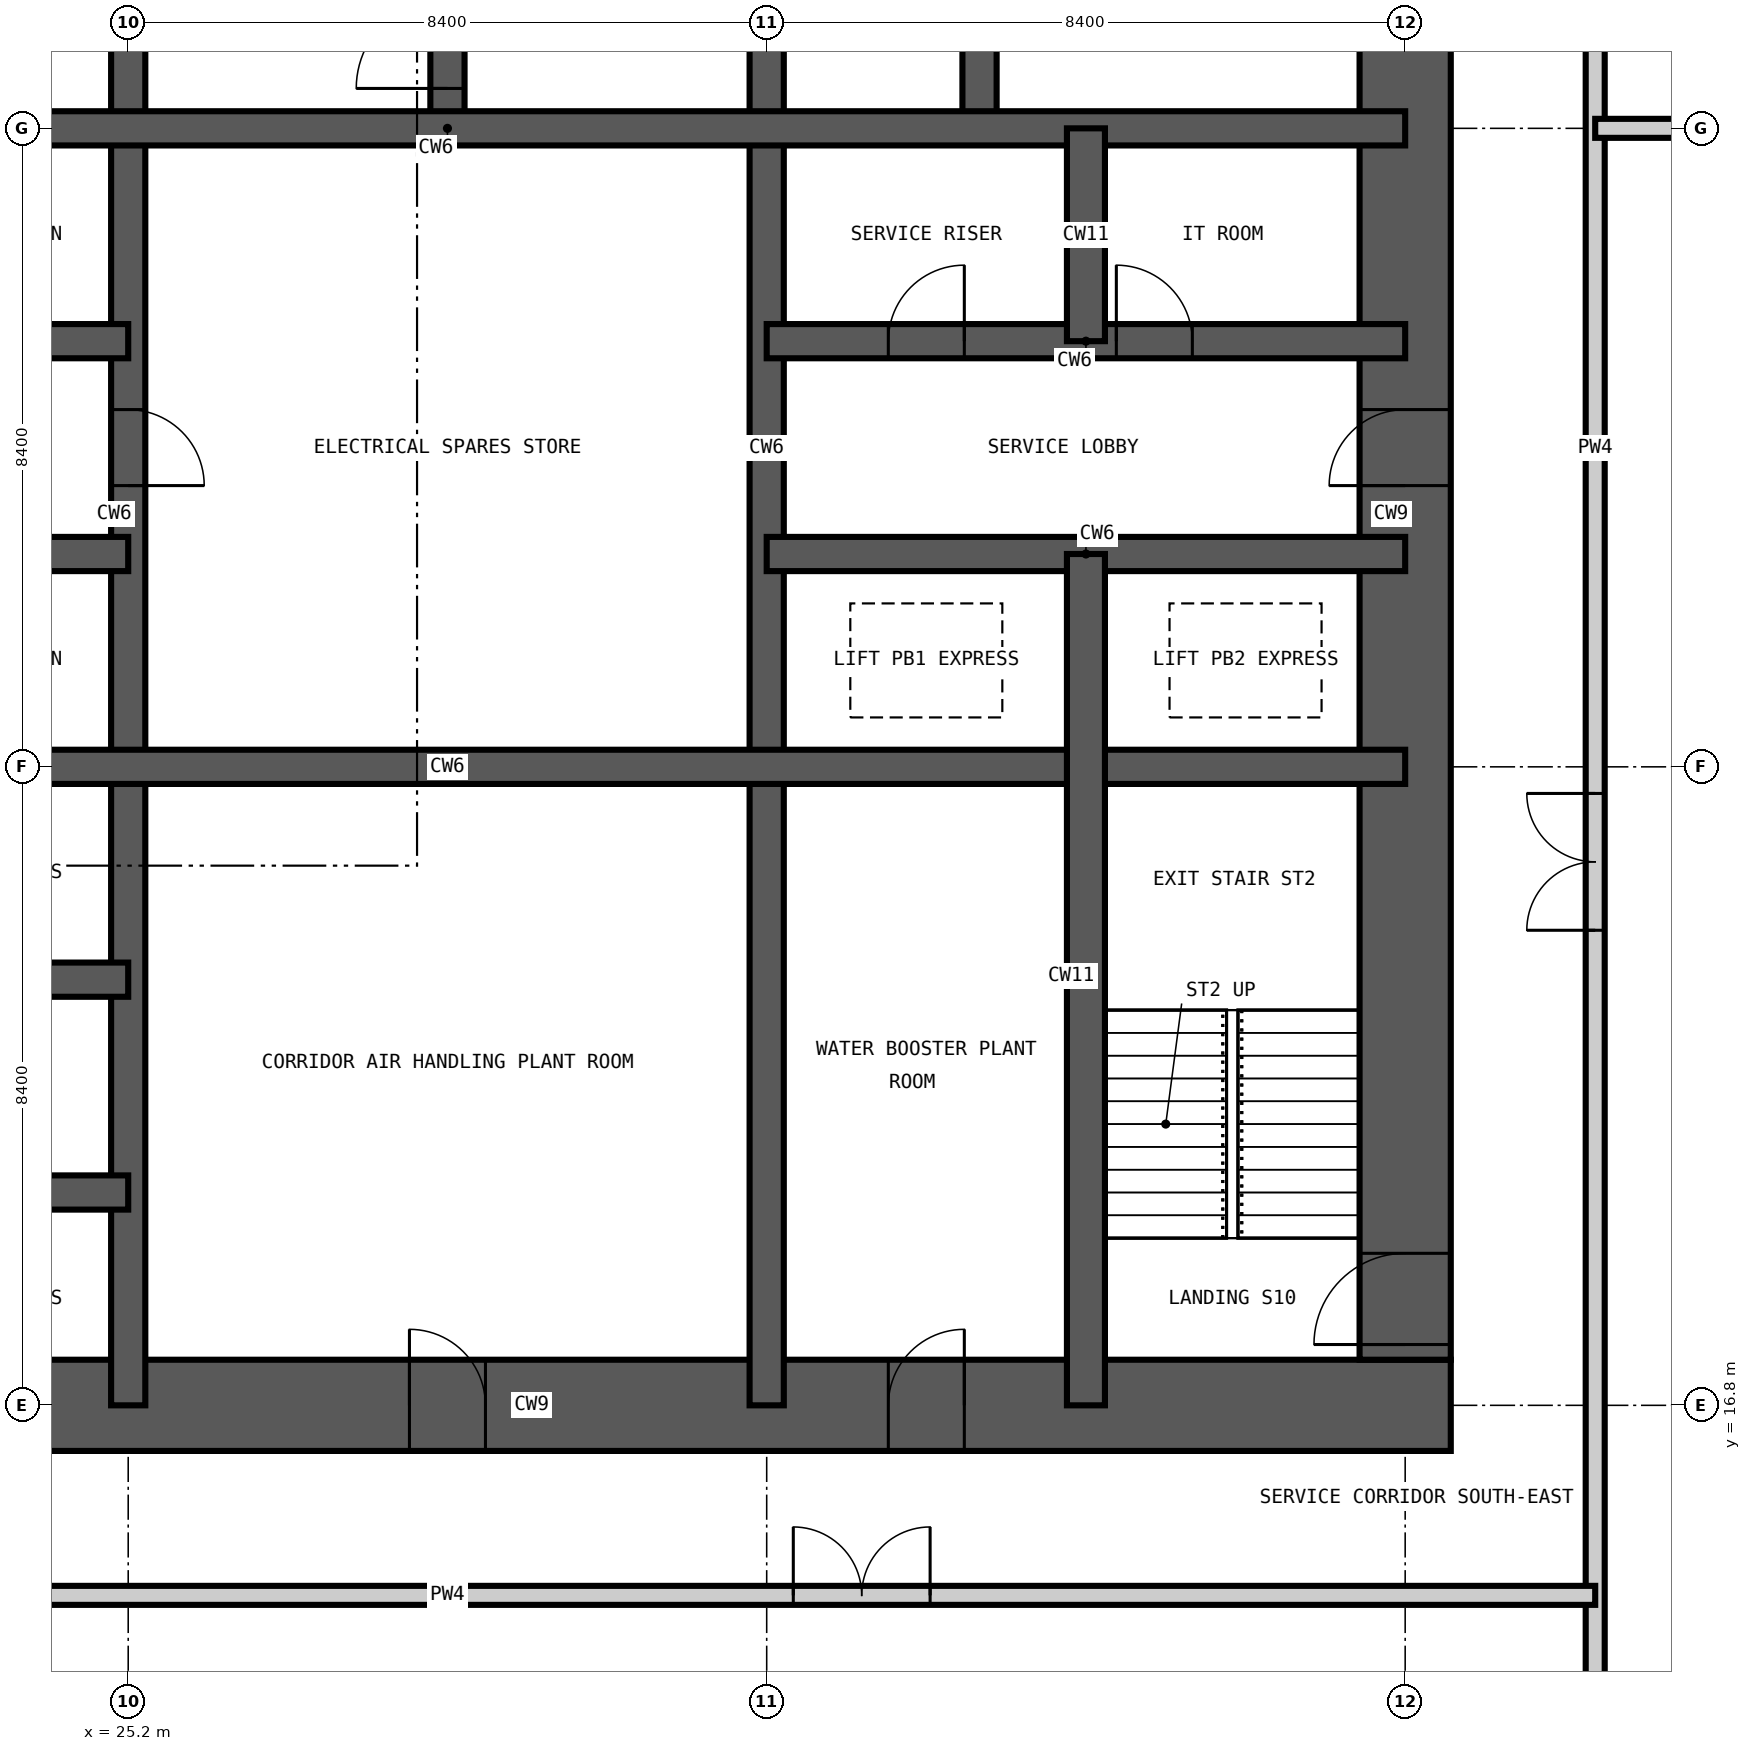
"""IFC4 building model, lengths in metres.
Left out: names, types, materials, properties, quantities, classifications, styles, units other than length and angle.
Written with IfcOpenShell. Run it as: python <this file> out.ifc"""

import sys

from ifc_helpers import new_model, si_unit, direction, frame, frame_2d, origin, place, context, subcontext, project, spatial, rectangle, extrude, element, fill, save


model = new_model("IFC4")
c1 = context("Model", 3, precision=1e-05, world=origin(), true_north=direction((0.0, 1.0)))
c2 = subcontext(c1, "Body", "Model", "MODEL_VIEW")
j1 = project(units=[si_unit("LENGTHUNIT", "METRE"), si_unit("PLANEANGLEUNIT", "RADIAN")], contexts=[c1])
p1 = place(None, origin())
s1 = spatial("IfcSite", under=j1, at=p1, CompositionType="ELEMENT")
p2 = place(p1, origin())
s2 = spatial("IfcBuilding", under=s1, at=p2, CompositionType="ELEMENT")
p3 = place(p2, frame((0.0, 0.0, 88.2)))
s3 = spatial("IfcBuildingStorey", under=s2, at=p3, CompositionType="ELEMENT", Elevation=88.2)
p4 = place(p3, frame((16.2, 16.8, -0.4), z_axis=(0.0, 0.0, 1.0), x_axis=(1.0, 0.0, 0.0)))
e1 = element("IfcWall", 1, at=p4, inside=s3, PredefinedType="SHEAR", context=c2, shape_type="SweptSolid", body=[
    extrude(rectangle(XDim=26.4, YDim=1.2, at=frame_2d((13.2, 0.0))), origin(), (0.0, 0.0, 1.0), 5.45),
])
p5 = place(p4, frame((12.7, 0.0, 0.4)))
e2 = element("IfcOpeningElement", 2, at=p5, cuts=e1, PredefinedType="OPENING", context=c2, shape_type="SweptSolid", body=[
    extrude(rectangle(XDim=1.0, YDim=2.1, at=frame_2d((0.5, 1.05))), frame((0.0, 0.61, 0.0), z_axis=(0.0, -1.0, 0.0), x_axis=(1.0, 0.0, 0.0)), (0.0, 0.0, 1.0), 1.22),
])
p6 = place(p4, frame((19.0, 0.0, 0.4)))
e3 = element("IfcOpeningElement", 3, at=p6, cuts=e1, PredefinedType="OPENING", context=c2, shape_type="SweptSolid", body=[
    extrude(rectangle(XDim=1.0, YDim=2.1, at=frame_2d((0.5, 1.05))), frame((0.0, 0.61, 0.0), z_axis=(0.0, -1.0, 0.0), x_axis=(1.0, 0.0, 0.0)), (0.0, 0.0, 1.0), 1.22),
])
p7 = place(p3, frame((42.0, 17.4, -0.4), z_axis=(0.0, 0.0, 1.0), x_axis=(0.0, 1.0, 0.0)))
e4 = element("IfcWall", 4, at=p7, inside=s3, PredefinedType="SHEAR", context=c2, shape_type="SweptSolid", body=[
    extrude(rectangle(XDim=24.0, YDim=1.2, at=frame_2d((12.0, 0.0))), origin(), (0.0, 0.0, 1.0), 5.45),
])
p8 = place(p7, frame((0.2, 0.0, 0.4)))
e5 = element("IfcOpeningElement", 5, at=p8, cuts=e4, PredefinedType="OPENING", context=c2, shape_type="SweptSolid", body=[
    extrude(rectangle(XDim=1.2, YDim=2.2, at=frame_2d((0.6, 1.1))), frame((0.0, 0.61, 0.0), z_axis=(0.0, -1.0, 0.0), x_axis=(1.0, 0.0, 0.0)), (0.0, 0.0, 1.0), 1.22),
])
p9 = place(p7, frame((11.5, 0.0, 0.4)))
e6 = element("IfcOpeningElement", 6, at=p9, cuts=e4, PredefinedType="OPENING", context=c2, shape_type="SweptSolid", body=[
    extrude(rectangle(XDim=1.0, YDim=2.1, at=frame_2d((0.5, 1.05))), frame((0.0, 0.61, 0.0), z_axis=(0.0, -1.0, 0.0), x_axis=(1.0, 0.0, 0.0)), (0.0, 0.0, 1.0), 1.22),
])
p10 = place(p7, frame((19.9, 0.0, 0.4)))
e7 = element("IfcOpeningElement", 7, at=p10, cuts=e4, PredefinedType="OPENING", context=c2, shape_type="SweptSolid", body=[
    extrude(rectangle(XDim=1.0, YDim=2.1, at=frame_2d((0.5, 1.05))), frame((0.0, 0.61, 0.0), z_axis=(0.0, -1.0, 0.0), x_axis=(1.0, 0.0, 0.0)), (0.0, 0.0, 1.0), 1.22),
])
p11 = place(p3, frame((25.2, 16.8, -0.4), z_axis=(0.0, 0.0, 1.0), x_axis=(0.0, 1.0, 0.0)))
e8 = element("IfcWall", 8, at=p11, inside=s3, PredefinedType="SHEAR", context=c2, shape_type="SweptSolid", body=[
    extrude(rectangle(XDim=25.2, YDim=0.45, at=frame_2d((12.6, 0.0))), origin(), (0.0, 0.0, 1.0), 5.45),
])
p12 = place(p11, frame((12.1, 0.0, 0.4)))
e9 = element("IfcOpeningElement", 9, at=p12, cuts=e8, PredefinedType="OPENING", context=c2, shape_type="SweptSolid", body=[
    extrude(rectangle(XDim=1.0, YDim=2.1, at=frame_2d((0.5, 1.05))), frame((0.0, 0.235, 0.0), z_axis=(0.0, -1.0, 0.0), x_axis=(1.0, 0.0, 0.0)), (0.0, 0.0, 1.0), 0.47),
])
p13 = place(p3, frame((29.4, 33.6, -0.4), z_axis=(0.0, 0.0, 1.0), x_axis=(0.0, 1.0, 0.0)))
e10 = element("IfcWall", 10, at=p13, inside=s3, PredefinedType="SHEAR", context=c2, shape_type="SweptSolid", body=[
    extrude(rectangle(XDim=8.4, YDim=0.45, at=frame_2d((4.2, 0.0))), origin(), (0.0, 0.0, 1.0), 5.45),
])
p14 = place(p13, frame((0.525, 0.0, 0.4)))
e11 = element("IfcOpeningElement", 11, at=p14, cuts=e10, PredefinedType="OPENING", context=c2, shape_type="SweptSolid", body=[
    extrude(rectangle(XDim=1.2, YDim=2.2, at=frame_2d((0.6, 1.1))), frame((0.0, 0.235, 0.0), z_axis=(0.0, -1.0, 0.0), x_axis=(1.0, 0.0, 0.0)), (0.0, 0.0, 1.0), 0.47),
])
p15 = place(p3, frame((33.6, 16.8, -0.4), z_axis=(0.0, 0.0, 1.0), x_axis=(0.0, 1.0, 0.0)))
e12 = element("IfcWall", 12, at=p15, inside=s3, PredefinedType="SHEAR", context=c2, shape_type="SweptSolid", body=[
    extrude(rectangle(XDim=25.2, YDim=0.45, at=frame_2d((12.6, 0.0))), origin(), (0.0, 0.0, 1.0), 5.45),
])
p16 = place(p15, frame((22.5, 0.0, 0.4)))
e13 = element("IfcOpeningElement", 13, at=p16, cuts=e12, PredefinedType="OPENING", context=c2, shape_type="SweptSolid", body=[
    extrude(rectangle(XDim=1.2, YDim=2.2, at=frame_2d((0.6, 1.1))), frame((0.0, 0.235, 0.0), z_axis=(0.0, -1.0, 0.0), x_axis=(1.0, 0.0, 0.0)), (0.0, 0.0, 1.0), 0.47),
])
p17 = place(p15, frame((18.3, 0.0, 0.4)))
e14 = element("IfcOpeningElement", 14, at=p17, cuts=e12, PredefinedType="OPENING", context=c2, shape_type="SweptSolid", body=[
    extrude(rectangle(XDim=1.2, YDim=2.2, at=frame_2d((0.6, 1.1))), frame((0.0, 0.235, 0.0), z_axis=(0.0, -1.0, 0.0), x_axis=(1.0, 0.0, 0.0)), (0.0, 0.0, 1.0), 0.47),
])
for number, where, z_axis, x_axis in (
    (15, (36.4, 33.6, -0.4), (0.0, 0.0, 1.0), (0.0, 1.0, 0.0)),
    (16, (16.8, 19.6, -0.4), (0.0, 0.0, 1.0), (1.0, 0.0, 0.0)),
    (17, (16.8, 22.4, -0.4), (0.0, 0.0, 1.0), (1.0, 0.0, 0.0)),
):
    element("IfcWall", number, at=place(p3, frame(where, z_axis=z_axis, x_axis=x_axis)), inside=s3, PredefinedType="SHEAR", context=c2, shape_type="SweptSolid", body=[
        extrude(rectangle(XDim=8.4, YDim=0.45, at=frame_2d((4.2, 0.0))), origin(), (0.0, 0.0, 1.0), 5.45),
    ])
p18 = place(p3, frame((16.8, 25.2, -0.4), z_axis=(0.0, 0.0, 1.0), x_axis=(1.0, 0.0, 0.0)))
e18 = element("IfcWall", 18, at=p18, inside=s3, PredefinedType="SHEAR", context=c2, shape_type="SweptSolid", body=[
    extrude(rectangle(XDim=25.2, YDim=0.45, at=frame_2d((12.6, 0.0))), origin(), (0.0, 0.0, 1.0), 5.45),
])
for number, where, z_axis, x_axis in (
    (19, (16.8, 28.0, -0.4), (0.0, 0.0, 1.0), (1.0, 0.0, 0.0)),
    (20, (33.6, 28.0, -0.4), (0.0, 0.0, 1.0), (1.0, 0.0, 0.0)),
    (21, (16.8, 30.8, -0.4), (0.0, 0.0, 1.0), (1.0, 0.0, 0.0)),
):
    element("IfcWall", number, at=place(p3, frame(where, z_axis=z_axis, x_axis=x_axis)), inside=s3, PredefinedType="SHEAR", context=c2, shape_type="SweptSolid", body=[
        extrude(rectangle(XDim=8.4, YDim=0.45, at=frame_2d((4.2, 0.0))), origin(), (0.0, 0.0, 1.0), 5.45),
    ])
p19 = place(p3, frame((33.6, 30.8, -0.4), z_axis=(0.0, 0.0, 1.0), x_axis=(1.0, 0.0, 0.0)))
e22 = element("IfcWall", 22, at=p19, inside=s3, PredefinedType="SHEAR", context=c2, shape_type="SweptSolid", body=[
    extrude(rectangle(XDim=8.4, YDim=0.45, at=frame_2d((4.2, 0.0))), origin(), (0.0, 0.0, 1.0), 5.45),
])
p20 = place(p19, frame((1.6, 0.0, 0.4)))
e23 = element("IfcOpeningElement", 23, at=p20, cuts=e22, PredefinedType="OPENING", context=c2, shape_type="SweptSolid", body=[
    extrude(rectangle(XDim=1.0, YDim=2.1, at=frame_2d((0.5, 1.05))), frame((0.0, 0.235, 0.0), z_axis=(0.0, -1.0, 0.0), x_axis=(1.0, 0.0, 0.0)), (0.0, 0.0, 1.0), 0.47),
])
p21 = place(p19, frame((4.6, 0.0, 0.4)))
e24 = element("IfcOpeningElement", 24, at=p21, cuts=e22, PredefinedType="OPENING", context=c2, shape_type="SweptSolid", body=[
    extrude(rectangle(XDim=1.0, YDim=2.1, at=frame_2d((0.5, 1.05))), frame((0.0, 0.235, 0.0), z_axis=(0.0, -1.0, 0.0), x_axis=(1.0, 0.0, 0.0)), (0.0, 0.0, 1.0), 0.47),
])
p22 = place(p3, frame((16.8, 33.6, -0.4), z_axis=(0.0, 0.0, 1.0), x_axis=(1.0, 0.0, 0.0)))
e25 = element("IfcWall", 25, at=p22, inside=s3, PredefinedType="SHEAR", context=c2, shape_type="SweptSolid", body=[
    extrude(rectangle(XDim=25.2, YDim=0.45, at=frame_2d((12.6, 0.0))), origin(), (0.0, 0.0, 1.0), 5.45),
])
p23 = place(p3, frame((37.8, 16.8, -0.4), z_axis=(0.0, 0.0, 1.0), x_axis=(0.0, 1.0, 0.0)))
e26 = element("IfcWall", 26, at=p23, inside=s3, PredefinedType="SHEAR", context=c2, shape_type="SweptSolid", body=[
    extrude(rectangle(XDim=11.2, YDim=0.5, at=frame_2d((5.6, 0.0))), origin(), (0.0, 0.0, 1.0), 5.45),
])
p24 = place(p3, frame((37.8, 30.8, -0.4), z_axis=(0.0, 0.0, 1.0), x_axis=(0.0, 1.0, 0.0)))
e27 = element("IfcWall", 27, at=p24, inside=s3, PredefinedType="SHEAR", context=c2, shape_type="SweptSolid", body=[
    extrude(rectangle(XDim=2.8, YDim=0.5, at=frame_2d((1.4, 0.0))), origin(), (0.0, 0.0, 1.0), 5.45),
])
p25 = place(p3, frame((44.5, -0.018, 0.0), z_axis=(0.0, 0.0, 1.0), x_axis=(0.0, 1.0, 0.0)))
e28 = element("IfcWall", 28, at=p25, inside=s3, PredefinedType="PARTITIONING", context=c2, shape_type="SweptSolid", body=[
    extrude(rectangle(XDim=58.836, YDim=0.25, at=frame_2d((29.418, 0.0))), origin(), (0.0, 0.0, 1.0), 5.05),
])
p26 = place(p25, frame((23.068, 0.0, 0.0)))
e29 = element("IfcOpeningElement", 29, at=p26, cuts=e28, PredefinedType="OPENING", context=c2, shape_type="SweptSolid", body=[
    extrude(rectangle(XDim=1.8, YDim=2.4, at=frame_2d((0.9, 1.2))), frame((0.0, 0.135, 0.0), z_axis=(0.0, -1.0, 0.0), x_axis=(1.0, 0.0, 0.0)), (0.0, 0.0, 1.0), 0.27),
])
p27 = place(p25, frame((38.168, 0.0, 0.0)))
e30 = element("IfcOpeningElement", 30, at=p27, cuts=e28, PredefinedType="OPENING", context=c2, shape_type="SweptSolid", body=[
    extrude(rectangle(XDim=1.8, YDim=2.4, at=frame_2d((0.9, 1.2))), frame((0.0, 0.135, 0.0), z_axis=(0.0, -1.0, 0.0), x_axis=(1.0, 0.0, 0.0)), (0.0, 0.0, 1.0), 0.27),
])
p28 = place(p3, frame((14.3, 14.3, 0.0), z_axis=(0.0, 0.0, 1.0), x_axis=(1.0, 0.0, 0.0)))
e31 = element("IfcWall", 31, at=p28, inside=s3, PredefinedType="PARTITIONING", context=c2, shape_type="SweptSolid", body=[
    extrude(rectangle(XDim=30.2, YDim=0.25, at=frame_2d((15.1, 0.0))), origin(), (0.0, 0.0, 1.0), 5.05),
])
p29 = place(p28, frame((19.65, 0.0, 0.0)))
e32 = element("IfcOpeningElement", 32, at=p29, cuts=e31, PredefinedType="OPENING", context=c2, shape_type="SweptSolid", body=[
    extrude(rectangle(XDim=1.8, YDim=2.4, at=frame_2d((0.9, 1.2))), frame((0.0, 0.135, 0.0), z_axis=(0.0, -1.0, 0.0), x_axis=(1.0, 0.0, 0.0)), (0.0, 0.0, 1.0), 0.27),
])
p30 = place(p28, frame((4.55, 0.0, 0.0)))
e33 = element("IfcOpeningElement", 33, at=p30, cuts=e31, PredefinedType="OPENING", context=c2, shape_type="SweptSolid", body=[
    extrude(rectangle(XDim=1.8, YDim=2.4, at=frame_2d((0.9, 1.2))), frame((0.0, 0.135, 0.0), z_axis=(0.0, -1.0, 0.0), x_axis=(1.0, 0.0, 0.0)), (0.0, 0.0, 1.0), 0.27),
])
p31 = place(p3, frame((44.5, 33.6, 0.0), z_axis=(0.0, 0.0, 1.0), x_axis=(1.0, 0.0, 0.0)))
e34 = element("IfcWall", 34, at=p31, inside=s3, PredefinedType="PARTITIONING", context=c2, shape_type="SweptSolid", body=[
    extrude(rectangle(XDim=14.318, YDim=0.25, at=frame_2d((7.159, 0.0))), origin(), (0.0, 0.0, 1.0), 5.05),
])
p32 = place(p14, origin())
e35 = element("IfcDoor", 35, at=p32, inside=s3, OperationType="SINGLE_SWING_LEFT", PredefinedType="DOOR", context=c2, shape_type="SweptSolid", body=[
    extrude(rectangle(XDim=1.2, YDim=2.2, at=frame_2d((0.6, 1.1))), frame((0.0, 0.025, 0.0), z_axis=(0.0, -1.0, 0.0), x_axis=(1.0, 0.0, 0.0)), (0.0, 0.0, 1.0), 0.05),
])
fill(e11, e35)
p33 = place(p8, origin())
e36 = element("IfcDoor", 36, at=p33, inside=s3, OperationType="SINGLE_SWING_LEFT", PredefinedType="DOOR", context=c2, shape_type="SweptSolid", body=[
    extrude(rectangle(XDim=1.2, YDim=2.2, at=frame_2d((0.6, 1.1))), frame((0.0, 0.025, 0.0), z_axis=(0.0, -1.0, 0.0), x_axis=(1.0, 0.0, 0.0)), (0.0, 0.0, 1.0), 0.05),
])
fill(e5, e36)
p34 = place(p29, origin())
e37 = element("IfcDoor", 37, at=p34, inside=s3, OperationType="DOUBLE_DOOR_DOUBLE_SWING", PredefinedType="DOOR", context=c2, shape_type="SweptSolid", body=[
    extrude(rectangle(XDim=1.8, YDim=2.4, at=frame_2d((0.9, 1.2))), frame((0.0, 0.025, 0.0), z_axis=(0.0, -1.0, 0.0), x_axis=(1.0, 0.0, 0.0)), (0.0, 0.0, 1.0), 0.05),
])
fill(e32, e37)
p35 = place(p26, origin())
e38 = element("IfcDoor", 38, at=p35, inside=s3, OperationType="DOUBLE_DOOR_DOUBLE_SWING", PredefinedType="DOOR", context=c2, shape_type="SweptSolid", body=[
    extrude(rectangle(XDim=1.8, YDim=2.4, at=frame_2d((0.9, 1.2))), frame((0.0, 0.025, 0.0), z_axis=(0.0, -1.0, 0.0), x_axis=(1.0, 0.0, 0.0)), (0.0, 0.0, 1.0), 0.05),
])
fill(e29, e38)
p36 = place(p12, frame((1.0, 0.0, 0.0), z_axis=(0.0, 0.0, 1.0), x_axis=(-1.0, 0.0, 0.0)))
e39 = element("IfcDoor", 39, at=p36, inside=s3, OperationType="SINGLE_SWING_RIGHT", PredefinedType="DOOR", context=c2, shape_type="SweptSolid", body=[
    extrude(rectangle(XDim=1.0, YDim=2.1, at=frame_2d((0.5, 1.05))), frame((0.0, 0.025, 0.0), z_axis=(0.0, -1.0, 0.0), x_axis=(1.0, 0.0, 0.0)), (0.0, 0.0, 1.0), 0.05),
])
fill(e9, e39)
p37 = place(p20, origin())
e40 = element("IfcDoor", 40, at=p37, inside=s3, OperationType="SINGLE_SWING_RIGHT", PredefinedType="DOOR", context=c2, shape_type="SweptSolid", body=[
    extrude(rectangle(XDim=1.0, YDim=2.1, at=frame_2d((0.5, 1.05))), frame((0.0, 0.025, 0.0), z_axis=(0.0, -1.0, 0.0), x_axis=(1.0, 0.0, 0.0)), (0.0, 0.0, 1.0), 0.05),
])
fill(e23, e40)
p38 = place(p21, origin())
e41 = element("IfcDoor", 41, at=p38, inside=s3, OperationType="SINGLE_SWING_LEFT", PredefinedType="DOOR", context=c2, shape_type="SweptSolid", body=[
    extrude(rectangle(XDim=1.0, YDim=2.1, at=frame_2d((0.5, 1.05))), frame((0.0, 0.025, 0.0), z_axis=(0.0, -1.0, 0.0), x_axis=(1.0, 0.0, 0.0)), (0.0, 0.0, 1.0), 0.05),
])
fill(e24, e41)
p39 = place(p9, origin())
e42 = element("IfcDoor", 42, at=p39, inside=s3, OperationType="SINGLE_SWING_LEFT", PredefinedType="DOOR", context=c2, shape_type="SweptSolid", body=[
    extrude(rectangle(XDim=1.0, YDim=2.1, at=frame_2d((0.5, 1.05))), frame((0.0, 0.025, 0.0), z_axis=(0.0, -1.0, 0.0), x_axis=(1.0, 0.0, 0.0)), (0.0, 0.0, 1.0), 0.05),
])
fill(e6, e42)
p40 = place(p5, origin())
e43 = element("IfcDoor", 43, at=p40, inside=s3, OperationType="SINGLE_SWING_LEFT", PredefinedType="DOOR", context=c2, shape_type="SweptSolid", body=[
    extrude(rectangle(XDim=1.0, YDim=2.1, at=frame_2d((0.5, 1.05))), frame((0.0, 0.025, 0.0), z_axis=(0.0, -1.0, 0.0), x_axis=(1.0, 0.0, 0.0)), (0.0, 0.0, 1.0), 0.05),
])
fill(e2, e43)
p41 = place(p6, origin())
e44 = element("IfcDoor", 44, at=p41, inside=s3, OperationType="SINGLE_SWING_RIGHT", PredefinedType="DOOR", context=c2, shape_type="SweptSolid", body=[
    extrude(rectangle(XDim=1.0, YDim=2.1, at=frame_2d((0.5, 1.05))), frame((0.0, 0.025, 0.0), z_axis=(0.0, -1.0, 0.0), x_axis=(1.0, 0.0, 0.0)), (0.0, 0.0, 1.0), 0.05),
])
fill(e3, e44)
save(model, sys.argv[1])
